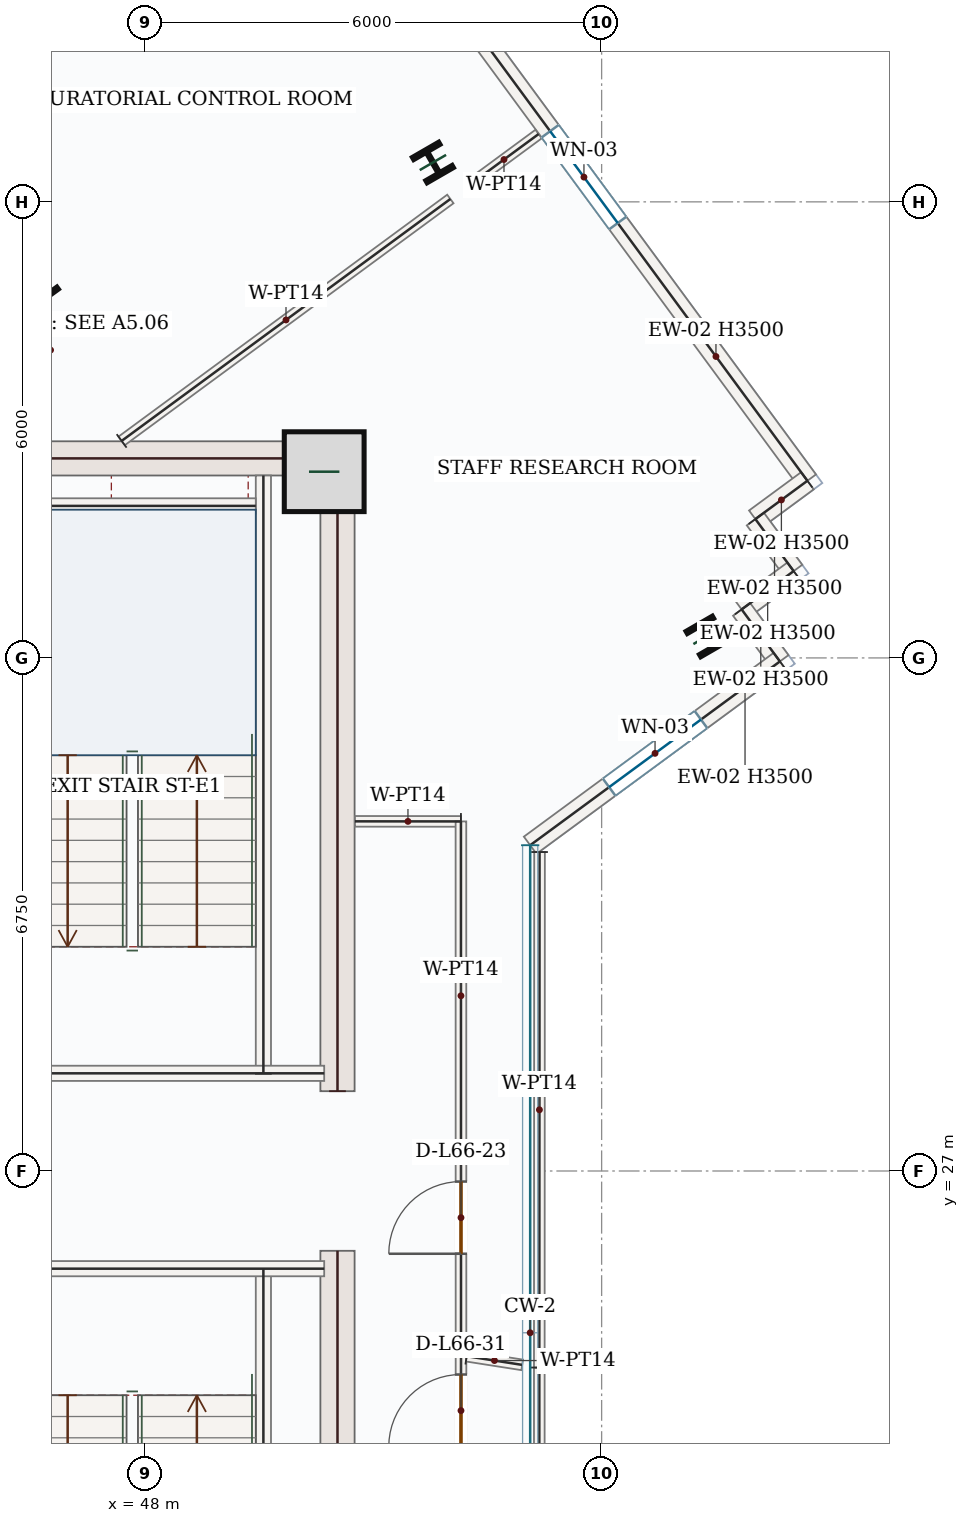
"""IFC4 building model, lengths in metres.
Left out: names, types, materials, properties, quantities, classifications, styles, units other than length and angle.
Written with IfcOpenShell. Run it as: python <this file> out.ifc"""

import sys

from ifc_helpers import new_model, si_unit, direction, frame, frame_2d, origin, origin_2d, place, context, subcontext, project, spatial, rectangle, i_section, extrude, source, transform, mapped, element, fill, save


model = new_model("IFC4")
c1 = context("Model", 3, precision=1e-05, world=origin(), true_north=direction((0.0, 1.0)))
c2 = subcontext(c1, "Body", "Model", "MODEL_VIEW")
j1 = project(units=[si_unit("LENGTHUNIT", "METRE"), si_unit("PLANEANGLEUNIT", "RADIAN")], contexts=[c1])
p1 = place(None, origin())
s1 = spatial("IfcSite", under=j1, at=p1, CompositionType="ELEMENT")
p2 = place(p1, origin())
s2 = spatial("IfcBuilding", under=s1, at=p2, CompositionType="ELEMENT")
p3 = place(p2, frame((0.0, 0.0, 276.6)))
s3 = spatial("IfcBuildingStorey", under=s2, at=p3, CompositionType="ELEMENT", Elevation=276.6)
m1 = source(origin(), c2, "Body", "SweptSolid", [
    extrude(rectangle(XDim=8.55, YDim=0.45, at=frame_2d((4.275, 0.0))), origin(), (0.0, 0.0, 1.0), 3.5),
])
for number, where, z_axis, x_axis in (
    (1, (50.525, 17.4, 0.0), (0.0, 0.0, 1.0), (0.0, 1.0, 0.0)),
    (2, (50.525, 28.05, 0.0), (0.0, 0.0, 1.0), (0.0, 1.0, 0.0)),
):
    element("IfcWall", number, at=place(p3, frame(where, z_axis=z_axis, x_axis=x_axis)), inside=s3, PredefinedType="SHEAR", context=c2, shape_type="MappedRepresentation", body=[
        mapped(m1, transform((0.0, 0.0, 0.0), x_axis=(1.0, 0.0, 0.0), y_axis=(0.0, 1.0, 0.0), z_axis=(0.0, 0.0, 1.0), scale=1.0)),
    ])
m2 = source(origin(), c2, "Body", "SweptSolid", [
    extrude(rectangle(XDim=7.1, YDim=0.45, at=frame_2d((3.55, 0.0))), origin(), (0.0, 0.0, 1.0), 3.5),
])
p4 = place(p3, frame((43.2, 36.375, 0.0), z_axis=(0.0, 0.0, 1.0), x_axis=(1.0, 0.0, 0.0)))
e3 = element("IfcWall", 3, at=p4, inside=s3, PredefinedType="SHEAR", context=c2, shape_type="MappedRepresentation", body=[
    mapped(m2, transform((0.0, 0.0, 0.0), x_axis=(1.0, 0.0, 0.0), y_axis=(0.0, 1.0, 0.0), z_axis=(0.0, 0.0, 1.0), scale=1.0)),
])
m3 = source(origin(), c2, "Body", "SweptSolid", [
    extrude(rectangle(XDim=1.05, YDim=1.05, at=origin_2d()), origin(), (0.0, 0.0, 1.0), 3.75),
])
p5 = place(p3, frame((50.35, 36.2, 0.0), z_axis=(0.0, 0.0, 1.0), x_axis=(1.0, 0.0, 0.0)))
e4 = element("IfcColumn", 4, at=p5, inside=s3, PredefinedType="COLUMN", context=c2, shape_type="MappedRepresentation", body=[
    mapped(m3, transform((0.0, 0.0, 0.0), x_axis=(1.0, 0.0, 0.0), y_axis=(0.0, 1.0, 0.0), z_axis=(0.0, 0.0, 1.0), scale=1.0)),
])
m4 = source(origin(), c2, "Body", "SweptSolid", [
    extrude(i_section(OverallWidth=0.399, OverallDepth=0.386, WebThickness=0.021, FlangeThickness=0.033, FilletRadius=0.018, at=origin_2d()), origin(), (0.0, 0.0, 1.0), 3.75),
])
for number, where, z_axis, x_axis in (
    (5, (46.578, 38.641, 0.0), (0.0, 0.0, 1.0), (0.809, 0.588, 0.0)),
    (6, (55.38, 34.032, 0.0), (0.0, 0.0, 1.0), (0.866, 0.5, 0.0)),
    (7, (51.78, 40.268, 0.0), (0.0, 0.0, 1.0), (0.866, 0.5, 0.0)),
):
    element("IfcColumn", number, at=place(p3, frame(where, z_axis=z_axis, x_axis=x_axis)), inside=s3, PredefinedType="COLUMN", context=c2, shape_type="MappedRepresentation", body=[
        mapped(m4, transform((0.0, 0.0, 0.0), x_axis=(1.0, 0.0, 0.0), y_axis=(0.0, 1.0, 0.0), z_axis=(0.0, 0.0, 1.0), scale=1.0)),
    ])
p6 = place(p3, frame((41.423, 39.26, 0.0), z_axis=(0.0, 0.0, 1.0), x_axis=(0.805403112922, 0.592727446383, 0.0)))
e8 = element("IfcWall", 8, at=p6, inside=s3, PredefinedType="SOLIDWALL", context=c2, shape_type="SweptSolid", body=[
    extrude(rectangle(XDim=8.726, YDim=0.28, at=frame_2d((4.363, 0.0))), origin(), (0.0, 0.0, 1.0), 3.5),
])
p7 = place(p6, frame((2.917, 0.0, 0.0)))
e9 = element("IfcOpeningElement", 9, at=p7, cuts=e8, PredefinedType="OPENING", context=c2, shape_type="SweptSolid", body=[
    extrude(rectangle(XDim=1.05, YDim=2.15, at=frame_2d((0.525, 1.075))), frame((0.0, 0.15, 0.0), z_axis=(0.0, -1.0, 0.0), x_axis=(1.0, 0.0, 0.0)), (0.0, 0.0, 1.0), 0.3),
])
p8 = place(p3, frame((50.827, 44.07, 0.0), z_axis=(0.0, 0.0, 1.0), x_axis=(0.592722097771, -0.805407049146, 0.0)))
e10 = element("IfcWall", 10, at=p8, inside=s3, PredefinedType="SOLIDWALL", context=c2, shape_type="SweptSolid", body=[
    extrude(rectangle(XDim=9.92, YDim=0.28, at=frame_2d((4.96, 0.0))), origin(), (0.0, 0.0, 1.0), 3.5),
])
p9 = place(p8, frame((4.21, 0.0, 0.85)))
e11 = element("IfcOpeningElement", 11, at=p9, cuts=e10, PredefinedType="OPENING", context=c2, shape_type="SweptSolid", body=[
    extrude(rectangle(XDim=1.5, YDim=1.5, at=frame_2d((0.75, 0.75))), frame((0.0, 0.15, 0.0), z_axis=(0.0, -1.0, 0.0), x_axis=(1.0, 0.0, 0.0)), (0.0, 0.0, 1.0), 0.3),
])
m5 = source(origin(), c2, "Body", "SweptSolid", [
    extrude(rectangle(XDim=0.85, YDim=0.28, at=frame_2d((0.425, 0.0))), origin(), (0.0, 0.0, 1.0), 3.5),
])
for number, where, z_axis, x_axis in (
    (12, (56.707, 36.081, 0.0), (0.0, 0.0, 1.0), (-0.805, -0.593, 0.0)),
    (13, (56.023, 35.577, 0.0), (0.0, 0.0, 1.0), (0.593, -0.805, 0.0)),
):
    element("IfcWall", number, at=place(p3, frame(where, z_axis=z_axis, x_axis=x_axis)), inside=s3, PredefinedType="SOLIDWALL", context=c2, shape_type="MappedRepresentation", body=[
        mapped(m5, transform((0.0, 0.0, 0.0), x_axis=(1.0, 0.0, 0.0), y_axis=(0.0, 1.0, 0.0), z_axis=(0.0, 0.0, 1.0), scale=1.0)),
    ])
m6 = source(origin(), c2, "Body", "SweptSolid", [
    extrude(rectangle(XDim=0.85, YDim=0.28, at=frame_2d((0.425, 0.0))), origin(), (0.0, 0.0, 1.0), 3.5),
])
p10 = place(p3, frame((56.527, 34.892, 0.0), z_axis=(0.0, 0.0, 1.0), x_axis=(-0.805445398986, -0.592669983425, 0.0)))
e14 = element("IfcWall", 14, at=p10, inside=s3, PredefinedType="SOLIDWALL", context=c2, shape_type="MappedRepresentation", body=[
    mapped(m6, transform((0.0, 0.0, 0.0), x_axis=(1.0, 0.0, 0.0), y_axis=(0.0, 1.0, 0.0), z_axis=(0.0, 0.0, 1.0), scale=1.0)),
])
p11 = place(p3, frame((55.842, 34.388, 0.0), z_axis=(0.0, 0.0, 1.0), x_axis=(0.592807079659, -0.80534450163, 0.0)))
e15 = element("IfcWall", 15, at=p11, inside=s3, PredefinedType="SOLIDWALL", context=c2, shape_type="MappedRepresentation", body=[
    mapped(m5, transform((0.0, 0.0, 0.0), x_axis=(1.0, 0.0, 0.0), y_axis=(0.0, 1.0, 0.0), z_axis=(0.0, 0.0, 1.0), scale=1.0)),
])
p12 = place(p3, frame((56.346, 33.704, 0.0), z_axis=(0.0, 0.0, 1.0), x_axis=(-0.805410687764, -0.592717153486, 0.0)))
e16 = element("IfcWall", 16, at=p12, inside=s3, PredefinedType="SOLIDWALL", context=c2, shape_type="SweptSolid", body=[
    extrude(rectangle(XDim=4.079, YDim=0.28, at=frame_2d((2.04, 0.0))), origin(), (0.0, 0.0, 1.0), 3.5),
])
p13 = place(p12, frame((1.29, 0.0, 0.85)))
e17 = element("IfcOpeningElement", 17, at=p13, cuts=e16, PredefinedType="OPENING", context=c2, shape_type="SweptSolid", body=[
    extrude(rectangle(XDim=1.5, YDim=1.5, at=frame_2d((0.75, 0.75))), frame((0.0, 0.15, 0.0), z_axis=(0.0, -1.0, 0.0), x_axis=(1.0, 0.0, 0.0)), (0.0, 0.0, 1.0), 0.3),
])
m7 = source(origin(), c2, "Body", "SweptSolid", [
    extrude(rectangle(XDim=7.87, YDim=0.2, at=frame_2d((3.935, 0.0))), origin(), (0.0, 0.0, 1.0), 3.5),
])
for number, where, z_axis, x_axis in (
    (18, (49.55, 17.85, 0.0), (0.0, 0.0, 1.0), (0.0, 1.0, 0.0)),
    (19, (49.55, 28.28, 0.0), (0.0, 0.0, 1.0), (0.0, 1.0, 0.0)),
):
    element("IfcWall", number, at=place(p3, frame(where, z_axis=z_axis, x_axis=x_axis)), inside=s3, PredefinedType="SOLIDWALL", context=c2, shape_type="MappedRepresentation", body=[
        mapped(m7, transform((0.0, 0.0, 0.0), x_axis=(1.0, 0.0, 0.0), y_axis=(0.0, 1.0, 0.0), z_axis=(0.0, 0.0, 1.0), scale=1.0)),
    ])
m8 = source(origin(), c2, "Body", "SweptSolid", [
    extrude(rectangle(XDim=4.25, YDim=0.2, at=frame_2d((2.125, 0.0))), origin(), (0.0, 0.0, 1.0), 3.5),
])
for number, where, z_axis, x_axis in (
    (20, (46.1, 25.715, 0.0), (0.0, 0.0, 1.0), (1.0, 0.0, 0.0)),
    (21, (46.1, 28.285, 0.0), (0.0, 0.0, 1.0), (1.0, 0.0, 0.0)),
):
    element("IfcWall", number, at=place(p3, frame(where, z_axis=z_axis, x_axis=x_axis)), inside=s3, PredefinedType="SOLIDWALL", context=c2, shape_type="MappedRepresentation", body=[
        mapped(m8, transform((0.0, 0.0, 0.0), x_axis=(1.0, 0.0, 0.0), y_axis=(0.0, 1.0, 0.0), z_axis=(0.0, 0.0, 1.0), scale=1.0)),
    ])
m9 = source(origin(), c2, "Body", "SweptSolid", [
    extrude(rectangle(XDim=3.25, YDim=0.2, at=frame_2d((1.625, 0.0))), origin(), (0.0, 0.0, 1.0), 3.5),
])
p14 = place(p3, frame((46.2, 35.75, 0.0), z_axis=(0.0, 0.0, 1.0), x_axis=(1.0, 0.0, 0.0)))
e22 = element("IfcWall", 22, at=p14, inside=s3, PredefinedType="SOLIDWALL", context=c2, shape_type="MappedRepresentation", body=[
    mapped(m9, transform((0.0, 0.0, 0.0), x_axis=(1.0, 0.0, 0.0), y_axis=(0.0, 1.0, 0.0), z_axis=(0.0, 0.0, 1.0), scale=1.0)),
])
p15 = place(p3, frame((52.149, 22.478, 0.0), z_axis=(0.0, 0.0, 1.0), x_axis=(0.000465766135, 0.999999891531, 0.0)))
e23 = element("IfcWall", 23, at=p15, inside=s3, PredefinedType="PARTITIONING", context=c2, shape_type="SweptSolid", body=[
    extrude(rectangle(XDim=2.097, YDim=0.14, at=frame_2d((1.048, 0.0))), origin(), (0.0, 0.0, 1.0), 3.5),
])
p16 = place(p15, frame((0.894, 0.0, 0.0)))
e24 = element("IfcOpeningElement", 24, at=p16, cuts=e23, PredefinedType="OPENING", context=c2, shape_type="SweptSolid", body=[
    extrude(rectangle(XDim=0.95, YDim=2.15, at=frame_2d((0.475, 1.075))), frame((0.0, 0.08, 0.0), z_axis=(0.0, -1.0, 0.0), x_axis=(1.0, 0.0, 0.0)), (0.0, 0.0, 1.0), 0.16),
])
m10 = source(origin(), c2, "Body", "SweptSolid", [
    extrude(rectangle(XDim=0.739, YDim=0.14, at=frame_2d((0.369, 0.0))), origin(), (0.0, 0.0, 1.0), 3.5),
])
p17 = place(p3, frame((52.225, 24.563, 0.0), z_axis=(0.0, 0.0, 1.0), x_axis=(0.988021482099, -0.154316398709, 0.0)))
e25 = element("IfcWall", 25, at=p17, inside=s3, PredefinedType="PARTITIONING", context=c2, shape_type="MappedRepresentation", body=[
    mapped(m10, transform((0.0, 0.0, 0.0), x_axis=(1.0, 0.0, 0.0), y_axis=(0.0, 1.0, 0.0), z_axis=(0.0, 0.0, 1.0), scale=1.0)),
])
m11 = source(origin(), c2, "Body", "SweptSolid", [
    extrude(rectangle(XDim=6.006, YDim=0.14, at=frame_2d((3.003, 0.0))), origin(), (0.0, 0.0, 1.0), 3.5),
])
p18 = place(p3, frame((53.18, 24.414, 0.0), z_axis=(0.0, 0.0, 1.0), x_axis=(0.0, -1.0, 0.0)))
e26 = element("IfcWall", 26, at=p18, inside=s3, PredefinedType="PARTITIONING", context=c2, shape_type="MappedRepresentation", body=[
    mapped(m11, transform((0.0, 0.0, 0.0), x_axis=(1.0, 0.0, 0.0), y_axis=(0.0, 1.0, 0.0), z_axis=(0.0, 0.0, 1.0), scale=1.0)),
])
m12 = source(origin(), c2, "Body", "SweptSolid", [
    extrude(rectangle(XDim=1.394, YDim=0.14, at=frame_2d((0.697, 0.0))), origin(), (0.0, 0.0, 1.0), 3.5),
])
p19 = place(p3, frame((52.149, 31.599, 0.0), z_axis=(0.0, 0.0, 1.0), x_axis=(-0.999999754632, 0.000700525222, 0.0)))
e27 = element("IfcWall", 27, at=p19, inside=s3, PredefinedType="PARTITIONING", context=c2, shape_type="MappedRepresentation", body=[
    mapped(m12, transform((0.0, 0.0, 0.0), x_axis=(1.0, 0.0, 0.0), y_axis=(0.0, 1.0, 0.0), z_axis=(0.0, 0.0, 1.0), scale=1.0)),
])
m13 = source(origin(), c2, "Body", "SweptSolid", [
    extrude(rectangle(XDim=5.37, YDim=0.14, at=frame_2d((2.685, 0.0))), origin(), (0.0, 0.0, 1.0), 3.5),
])
p20 = place(p3, frame((47.685, 36.605, 0.0), z_axis=(0.0, 0.0, 1.0), x_axis=(0.805412248971, 0.592715032041, 0.0)))
e28 = element("IfcWall", 28, at=p20, inside=s3, PredefinedType="PARTITIONING", context=c2, shape_type="MappedRepresentation", body=[
    mapped(m13, transform((0.0, 0.0, 0.0), x_axis=(1.0, 0.0, 0.0), y_axis=(0.0, 1.0, 0.0), z_axis=(0.0, 0.0, 1.0), scale=1.0)),
])
m14 = source(origin(), c2, "Body", "SweptSolid", [
    extrude(rectangle(XDim=1.13, YDim=0.14, at=frame_2d((0.565, 0.0))), origin(), (0.0, 0.0, 1.0), 3.5),
])
p21 = place(p3, frame((52.26, 39.972, 0.0), z_axis=(0.0, 0.0, 1.0), x_axis=(0.805359802525, 0.592786292416, 0.0)))
e29 = element("IfcWall", 29, at=p21, inside=s3, PredefinedType="PARTITIONING", context=c2, shape_type="MappedRepresentation", body=[
    mapped(m14, transform((0.0, 0.0, 0.0), x_axis=(1.0, 0.0, 0.0), y_axis=(0.0, 1.0, 0.0), z_axis=(0.0, 0.0, 1.0), scale=1.0)),
])
m15 = source(origin(), c2, "Body", "SweptSolid", [
    extrude(rectangle(XDim=6.782, YDim=0.14, at=frame_2d((3.391, 0.0))), origin(), (0.0, 0.0, 1.0), 3.5),
])
p22 = place(p3, frame((53.183, 31.196, 0.0), z_axis=(0.0, 0.0, 1.0), x_axis=(-0.000467979358, -0.999999890498, 0.0)))
e30 = element("IfcWall", 30, at=p22, inside=s3, PredefinedType="PARTITIONING", context=c2, shape_type="MappedRepresentation", body=[
    mapped(m15, transform((0.0, 0.0, 0.0), x_axis=(1.0, 0.0, 0.0), y_axis=(0.0, 1.0, 0.0), z_axis=(0.0, 0.0, 1.0), scale=1.0)),
])
p23 = place(p3, frame((52.15, 24.575, 0.0), z_axis=(0.0, 0.0, 1.0), x_axis=(-0.000139028882, 0.999999990335, 0.0)))
e31 = element("IfcWall", 31, at=p23, inside=s3, PredefinedType="PARTITIONING", context=c2, shape_type="SweptSolid", body=[
    extrude(rectangle(XDim=7.024, YDim=0.14, at=frame_2d((3.512, 0.0))), origin(), (0.0, 0.0, 1.0), 3.5),
])
p24 = place(p23, frame((1.336, 0.0, 0.0)))
e32 = element("IfcOpeningElement", 32, at=p24, cuts=e31, PredefinedType="OPENING", context=c2, shape_type="SweptSolid", body=[
    extrude(rectangle(XDim=0.95, YDim=2.15, at=frame_2d((0.475, 1.075))), frame((0.0, 0.08, 0.0), z_axis=(0.0, -1.0, 0.0), x_axis=(1.0, 0.0, 0.0)), (0.0, 0.0, 1.0), 0.16),
])
m16 = source(origin(), c2, "Body", "SweptSolid", [
    extrude(rectangle(XDim=1.5, YDim=1.5, at=frame_2d((0.75, 0.75))), frame((0.0, 0.03, 0.0), z_axis=(0.0, -1.0, 0.0), x_axis=(1.0, 0.0, 0.0)), (0.0, 0.0, 1.0), 0.06),
])
p25 = place(p9, origin())
e33 = element("IfcWindow", 33, at=p25, inside=s3, PartitioningType="SINGLE_PANEL", PredefinedType="WINDOW", context=c2, shape_type="MappedRepresentation", body=[
    mapped(m16, transform((0.0, 0.0, 0.0), x_axis=(1.0, 0.0, 0.0), y_axis=(0.0, 1.0, 0.0), z_axis=(0.0, 0.0, 1.0), scale=1.0)),
])
fill(e11, e33)
p26 = place(p13, origin())
e34 = element("IfcWindow", 34, at=p26, inside=s3, PartitioningType="SINGLE_PANEL", PredefinedType="WINDOW", context=c2, shape_type="MappedRepresentation", body=[
    mapped(m16, transform((0.0, 0.0, 0.0), x_axis=(1.0, 0.0, 0.0), y_axis=(0.0, 1.0, 0.0), z_axis=(0.0, 0.0, 1.0), scale=1.0)),
])
fill(e17, e34)
m17 = source(origin(), c2, "Body", "SweptSolid", [
    extrude(rectangle(XDim=0.95, YDim=2.15, at=frame_2d((0.475, 1.075))), frame((0.0, 0.025, 0.0), z_axis=(0.0, -1.0, 0.0), x_axis=(1.0, 0.0, 0.0)), (0.0, 0.0, 1.0), 0.05),
])
p27 = place(p24, origin())
e35 = element("IfcDoor", 35, at=p27, inside=s3, OperationType="SINGLE_SWING_LEFT", PredefinedType="DOOR", context=c2, shape_type="MappedRepresentation", body=[
    mapped(m17, transform((0.0, 0.0, 0.0), x_axis=(1.0, 0.0, 0.0), y_axis=(0.0, 1.0, 0.0), z_axis=(0.0, 0.0, 1.0), scale=1.0)),
])
fill(e32, e35)
p28 = place(p16, origin())
e36 = element("IfcDoor", 36, at=p28, inside=s3, OperationType="SINGLE_SWING_LEFT", PredefinedType="DOOR", context=c2, shape_type="MappedRepresentation", body=[
    mapped(m17, transform((0.0, 0.0, 0.0), x_axis=(1.0, 0.0, 0.0), y_axis=(0.0, 1.0, 0.0), z_axis=(0.0, 0.0, 1.0), scale=1.0)),
])
fill(e24, e36)
save(model, sys.argv[1])
